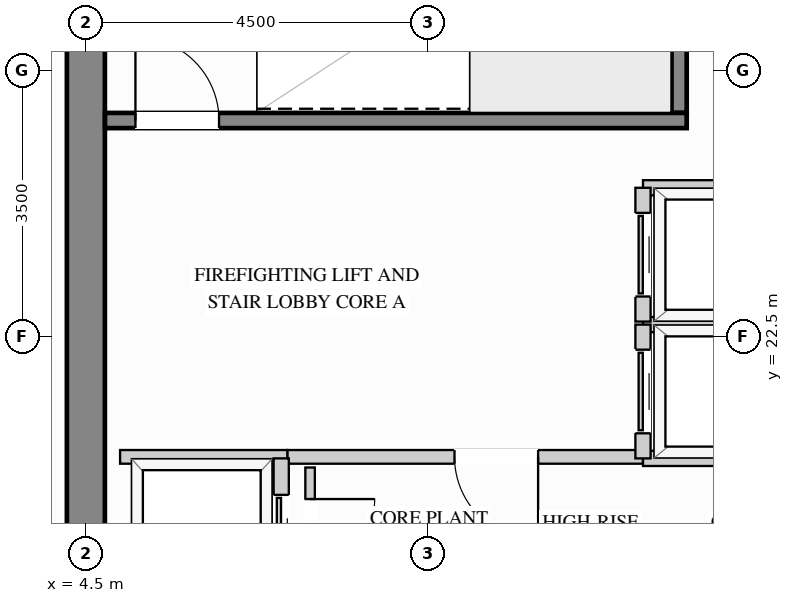
"""IFC4 building model, lengths in metres.
Left out: names, types, materials, properties, quantities, classifications, styles, units other than length and angle.
Written with IfcOpenShell. Run it as: python <this file> out.ifc"""

import sys

from ifc_helpers import new_model, si_unit, direction, frame, frame_2d, origin, place, context, subcontext, project, spatial, rectangle, extrude, source, transform, mapped, element, fill, save


model = new_model("IFC4")
c1 = context("Model", 3, precision=1e-05, world=origin(), true_north=direction((0.0, 1.0)))
c2 = subcontext(c1, "Body", "Model", "MODEL_VIEW")
j1 = project(units=[si_unit("LENGTHUNIT", "METRE"), si_unit("PLANEANGLEUNIT", "RADIAN")], contexts=[c1])
p1 = place(None, origin())
s1 = spatial("IfcSite", under=j1, at=p1, CompositionType="ELEMENT")
p2 = place(p1, origin())
s2 = spatial("IfcBuilding", under=s1, at=p2, CompositionType="ELEMENT")
p3 = place(p2, frame((0.0, 0.0, 252.0)))
s3 = spatial("IfcBuildingStorey", under=s2, at=p3, CompositionType="ELEMENT", Elevation=252.0)
m1 = source(origin(), c2, "Body", "SweptSolid", [
    extrude(rectangle(XDim=20.5, YDim=0.5, at=frame_2d((10.25, 0.0))), origin(), (0.0, 0.0, 1.0), 3.4),
])
p4 = place(p3, frame((4.5, 8.75, 0.0), z_axis=(0.0, 0.0, 1.0), x_axis=(0.0, 1.0, 0.0)))
e1 = element("IfcWall", 1, at=p4, inside=s3, PredefinedType="SHEAR", context=c2, shape_type="MappedRepresentation", body=[
    mapped(m1, transform((0.0, 0.0, 0.0), x_axis=(1.0, 0.0, 0.0), y_axis=(0.0, 1.0, 0.0), z_axis=(0.0, 0.0, 1.0))),
])
p5 = place(p3, frame((7.15, 20.92, 0.0), z_axis=(0.0, 0.0, 1.0), x_axis=(1.0, 0.0, 0.0)))
e2 = element("IfcWall", 2, at=p5, inside=s3, PredefinedType="PARTITIONING", context=c2, shape_type="SweptSolid", body=[
    extrude(rectangle(XDim=4.68, YDim=0.18, at=frame_2d((2.34, 0.0))), origin(), (0.0, 0.0, 1.0), 3.385),
])
p6 = place(p5, frame((2.2, 0.0, 0.0)))
e3 = element("IfcOpeningElement", 3, at=p6, cuts=e2, PredefinedType="OPENING", context=c2, shape_type="SweptSolid", body=[
    extrude(rectangle(XDim=1.1, YDim=2.15, at=frame_2d((0.55, 1.075))), frame((0.0, 0.1, 0.0), z_axis=(0.0, -1.0, 0.0), x_axis=(1.0, 0.0, 0.0)), (0.0, 0.0, 1.0), 0.2),
])
m2 = source(origin(), c2, "Body", "SweptSolid", [
    extrude(rectangle(XDim=2.2, YDim=0.18, at=frame_2d((1.1, 0.0))), origin(), (0.0, 0.0, 1.0), 3.385),
])
p7 = place(p3, frame((4.95, 20.92, 0.0), z_axis=(0.0, 0.0, 1.0), x_axis=(1.0, 0.0, 0.0)))
e4 = element("IfcWall", 4, at=p7, inside=s3, PredefinedType="PARTITIONING", context=c2, shape_type="MappedRepresentation", body=[
    mapped(m2, transform((0.0, 0.0, 0.0), x_axis=(1.0, 0.0, 0.0), y_axis=(0.0, 1.0, 0.0), z_axis=(0.0, 0.0, 1.0))),
])
p8 = place(p3, frame((7.45, 19.2, 0.0), z_axis=(0.0, 0.0, 1.0), x_axis=(0.0, 1.0, 0.0)))
e5 = element("IfcWall", 5, at=p8, inside=s3, PredefinedType="PARTITIONING", context=c2, shape_type="SweptSolid", body=[
    extrude(rectangle(XDim=1.58, YDim=0.125, at=frame_2d((0.79, 0.0))), origin(), (0.0, 0.0, 1.0), 3.385),
])
p9 = place(p8, frame((0.315, 0.0, 0.0)))
e6 = element("IfcOpeningElement", 6, at=p9, cuts=e5, PredefinedType="OPENING", context=c2, shape_type="SweptSolid", body=[
    extrude(rectangle(XDim=0.85, YDim=2.1, at=frame_2d((0.425, 1.05))), frame((0.0, 0.073, 0.0), z_axis=(0.0, -1.0, 0.0), x_axis=(1.0, 0.0, 0.0)), (0.0, 0.0, 1.0), 0.145),
])
m3 = source(origin(), c2, "Body", "SweptSolid", [
    extrude(rectangle(XDim=2.39, YDim=0.2, at=frame_2d((1.195, 0.0))), origin(), (0.0, 0.0, 1.0), 3.385),
])
for number, where, z_axis, x_axis in (
    (7, (11.83, 22.66, 0.0), (0.0, 0.0, 1.0), (1.0, 0.0, 0.0)),
    (8, (11.83, 20.9, 0.0), (0.0, 0.0, 1.0), (1.0, 0.0, 0.0)),
):
    element("IfcWall", number, at=place(p3, frame(where, z_axis=z_axis, x_axis=x_axis)), inside=s3, PredefinedType="PARTITIONING", context=c2, shape_type="MappedRepresentation", body=[
        mapped(m3, transform((0.0, 0.0, 0.0), x_axis=(1.0, 0.0, 0.0), y_axis=(0.0, 1.0, 0.0), z_axis=(0.0, 0.0, 1.0))),
    ])
p10 = place(p3, frame((11.83, 20.9, 0.0), z_axis=(0.0, 0.0, 1.0), x_axis=(0.0, 1.0, 0.0)))
e9 = element("IfcWall", 9, at=p10, inside=s3, PredefinedType="PARTITIONING", context=c2, shape_type="SweptSolid", body=[
    extrude(rectangle(XDim=1.76, YDim=0.2, at=frame_2d((0.88, 0.0))), origin(), (0.0, 0.0, 1.0), 3.385),
])
p11 = place(p10, frame((0.33, 0.0, 0.0)))
e10 = element("IfcOpeningElement", 10, at=p11, cuts=e9, PredefinedType="OPENING", context=c2, shape_type="SweptSolid", body=[
    extrude(rectangle(XDim=1.1, YDim=2.2, at=frame_2d((0.55, 1.1))), frame((0.0, 0.11, 0.0), z_axis=(0.0, -1.0, 0.0), x_axis=(1.0, 0.0, 0.0)), (0.0, 0.0, 1.0), 0.22),
])
p12 = place(p3, frame((11.83, 24.46, 0.0), z_axis=(0.0, 0.0, 1.0), x_axis=(1.0, 0.0, 0.0)))
e11 = element("IfcWall", 11, at=p12, inside=s3, PredefinedType="PARTITIONING", context=c2, shape_type="MappedRepresentation", body=[
    mapped(m3, transform((0.0, 0.0, 0.0), x_axis=(1.0, 0.0, 0.0), y_axis=(0.0, 1.0, 0.0), z_axis=(0.0, 0.0, 1.0))),
])
p13 = place(p3, frame((11.83, 22.7, 0.0), z_axis=(0.0, 0.0, 1.0), x_axis=(0.0, 1.0, 0.0)))
e12 = element("IfcWall", 12, at=p13, inside=s3, PredefinedType="PARTITIONING", context=c2, shape_type="SweptSolid", body=[
    extrude(rectangle(XDim=1.76, YDim=0.2, at=frame_2d((0.88, 0.0))), origin(), (0.0, 0.0, 1.0), 3.385),
])
p14 = place(p13, frame((0.33, 0.0, 0.0)))
e13 = element("IfcOpeningElement", 13, at=p14, cuts=e12, PredefinedType="OPENING", context=c2, shape_type="SweptSolid", body=[
    extrude(rectangle(XDim=1.1, YDim=2.2, at=frame_2d((0.55, 1.1))), frame((0.0, 0.11, 0.0), z_axis=(0.0, -1.0, 0.0), x_axis=(1.0, 0.0, 0.0)), (0.0, 0.0, 1.0), 0.22),
])
p15 = place(p3, frame((7.07, 18.84, 0.0), z_axis=(0.0, 0.0, 1.0), x_axis=(0.0, 1.0, 0.0)))
e14 = element("IfcWall", 14, at=p15, inside=s3, PredefinedType="PARTITIONING", context=c2, shape_type="SweptSolid", body=[
    extrude(rectangle(XDim=2.06, YDim=0.2, at=frame_2d((1.03, 0.0))), origin(), (0.0, 0.0, 1.0), 3.385),
])
p16 = place(p15, frame((0.48, 0.0, 0.0)))
e15 = element("IfcOpeningElement", 15, at=p16, cuts=e14, PredefinedType="OPENING", context=c2, shape_type="SweptSolid", body=[
    extrude(rectangle(XDim=1.1, YDim=2.2, at=frame_2d((0.55, 1.1))), frame((0.0, 0.11, 0.0), z_axis=(0.0, -1.0, 0.0), x_axis=(1.0, 0.0, 0.0)), (0.0, 0.0, 1.0), 0.22),
])
m4 = source(origin(), c2, "Body", "SweptSolid", [
    extrude(rectangle(XDim=3.803, YDim=0.2, at=frame_2d((1.901, 0.0))), origin(), (0.0, 0.0, 1.0), 3.4),
])
p17 = place(p3, frame((12.305, 25.445, 0.0), z_axis=(0.0, 0.0, 1.0), x_axis=(0.0, 1.0, 0.0)))
e16 = element("IfcWall", 16, at=p17, inside=s3, PredefinedType="SHEAR", context=c2, shape_type="MappedRepresentation", body=[
    mapped(m4, transform((0.0, 0.0, 0.0), x_axis=(1.0, 0.0, 0.0), y_axis=(0.0, 1.0, 0.0), z_axis=(0.0, 0.0, 1.0))),
])
p18 = place(p3, frame((4.752, 25.345, 0.0), z_axis=(0.0, 0.0, 1.0), x_axis=(1.0, 0.0, 0.0)))
e17 = element("IfcWall", 17, at=p18, inside=s3, PredefinedType="SHEAR", context=c2, shape_type="SweptSolid", body=[
    extrude(rectangle(XDim=7.653, YDim=0.2, at=frame_2d((3.827, 0.0))), origin(), (0.0, 0.0, 1.0), 3.4),
])
p19 = place(p18, frame((0.4, 0.0, 0.0)))
e18 = element("IfcOpeningElement", 18, at=p19, cuts=e17, PredefinedType="OPENING", context=c2, shape_type="SweptSolid", body=[
    extrude(rectangle(XDim=1.1, YDim=2.15, at=frame_2d((0.55, 1.075))), frame((0.0, 0.11, 0.0), z_axis=(0.0, -1.0, 0.0), x_axis=(1.0, 0.0, 0.0)), (0.0, 0.0, 1.0), 0.22),
])
m5 = source(origin(), c2, "Body", "SweptSolid", [
    extrude(rectangle(XDim=1.1, YDim=2.15, at=frame_2d((0.55, 1.075))), frame((0.0, 0.025, 0.0), z_axis=(0.0, -1.0, 0.0), x_axis=(1.0, 0.0, 0.0)), (0.0, 0.0, 1.0), 0.05),
])
p20 = place(p6, origin())
e19 = element("IfcDoor", 19, at=p20, inside=s3, OperationType="SINGLE_SWING_RIGHT", PredefinedType="DOOR", context=c2, shape_type="MappedRepresentation", body=[
    mapped(m5, transform((0.0, 0.0, 0.0), x_axis=(1.0, 0.0, 0.0), y_axis=(0.0, 1.0, 0.0), z_axis=(0.0, 0.0, 1.0))),
])
fill(e3, e19)
m6 = source(origin(), c2, "Body", "SweptSolid", [
    extrude(rectangle(XDim=1.1, YDim=2.2, at=frame_2d((0.55, 1.1))), frame((0.0, 0.025, 0.0), z_axis=(0.0, -1.0, 0.0), x_axis=(1.0, 0.0, 0.0)), (0.0, 0.0, 1.0), 0.05),
])
p21 = place(p11, origin())
e20 = element("IfcDoor", 20, at=p21, inside=s3, OperationType="SLIDING_TO_LEFT", PredefinedType="DOOR", context=c2, shape_type="MappedRepresentation", body=[
    mapped(m6, transform((0.0, 0.0, 0.0), x_axis=(1.0, 0.0, 0.0), y_axis=(0.0, 1.0, 0.0), z_axis=(0.0, 0.0, 1.0))),
])
fill(e10, e20)
p22 = place(p14, origin())
e21 = element("IfcDoor", 21, at=p22, inside=s3, OperationType="SLIDING_TO_LEFT", PredefinedType="DOOR", context=c2, shape_type="MappedRepresentation", body=[
    mapped(m6, transform((0.0, 0.0, 0.0), x_axis=(1.0, 0.0, 0.0), y_axis=(0.0, 1.0, 0.0), z_axis=(0.0, 0.0, 1.0))),
])
fill(e13, e21)
p23 = place(p16, origin())
e22 = element("IfcDoor", 22, at=p23, inside=s3, OperationType="SLIDING_TO_LEFT", PredefinedType="DOOR", context=c2, shape_type="MappedRepresentation", body=[
    mapped(m6, transform((0.0, 0.0, 0.0), x_axis=(1.0, 0.0, 0.0), y_axis=(0.0, 1.0, 0.0), z_axis=(0.0, 0.0, 1.0))),
])
fill(e15, e22)
m7 = source(origin(), c2, "Body", "SweptSolid", [
    extrude(rectangle(XDim=0.85, YDim=2.1, at=frame_2d((0.425, 1.05))), frame((0.0, 0.025, 0.0), z_axis=(0.0, -1.0, 0.0), x_axis=(1.0, 0.0, 0.0)), (0.0, 0.0, 1.0), 0.05),
])
p24 = place(p9, origin())
e23 = element("IfcDoor", 23, at=p24, inside=s3, OperationType="SINGLE_SWING_RIGHT", PredefinedType="DOOR", context=c2, shape_type="MappedRepresentation", body=[
    mapped(m7, transform((0.0, 0.0, 0.0), x_axis=(1.0, 0.0, 0.0), y_axis=(0.0, 1.0, 0.0), z_axis=(0.0, 0.0, 1.0))),
])
fill(e6, e23)
m8 = source(origin(), c2, "Body", "SweptSolid", [
    extrude(rectangle(XDim=1.1, YDim=2.15, at=frame_2d((0.55, 1.075))), frame((0.0, 0.025, 0.0), z_axis=(0.0, -1.0, 0.0), x_axis=(1.0, 0.0, 0.0)), (0.0, 0.0, 1.0), 0.05),
])
p25 = place(p19, origin())
e24 = element("IfcDoor", 24, at=p25, inside=s3, OperationType="SINGLE_SWING_LEFT", PredefinedType="DOOR", context=c2, shape_type="MappedRepresentation", body=[
    mapped(m8, transform((0.0, 0.0, 0.0), x_axis=(1.0, 0.0, 0.0), y_axis=(0.0, 1.0, 0.0), z_axis=(0.0, 0.0, 1.0))),
])
fill(e18, e24)
save(model, sys.argv[1])
